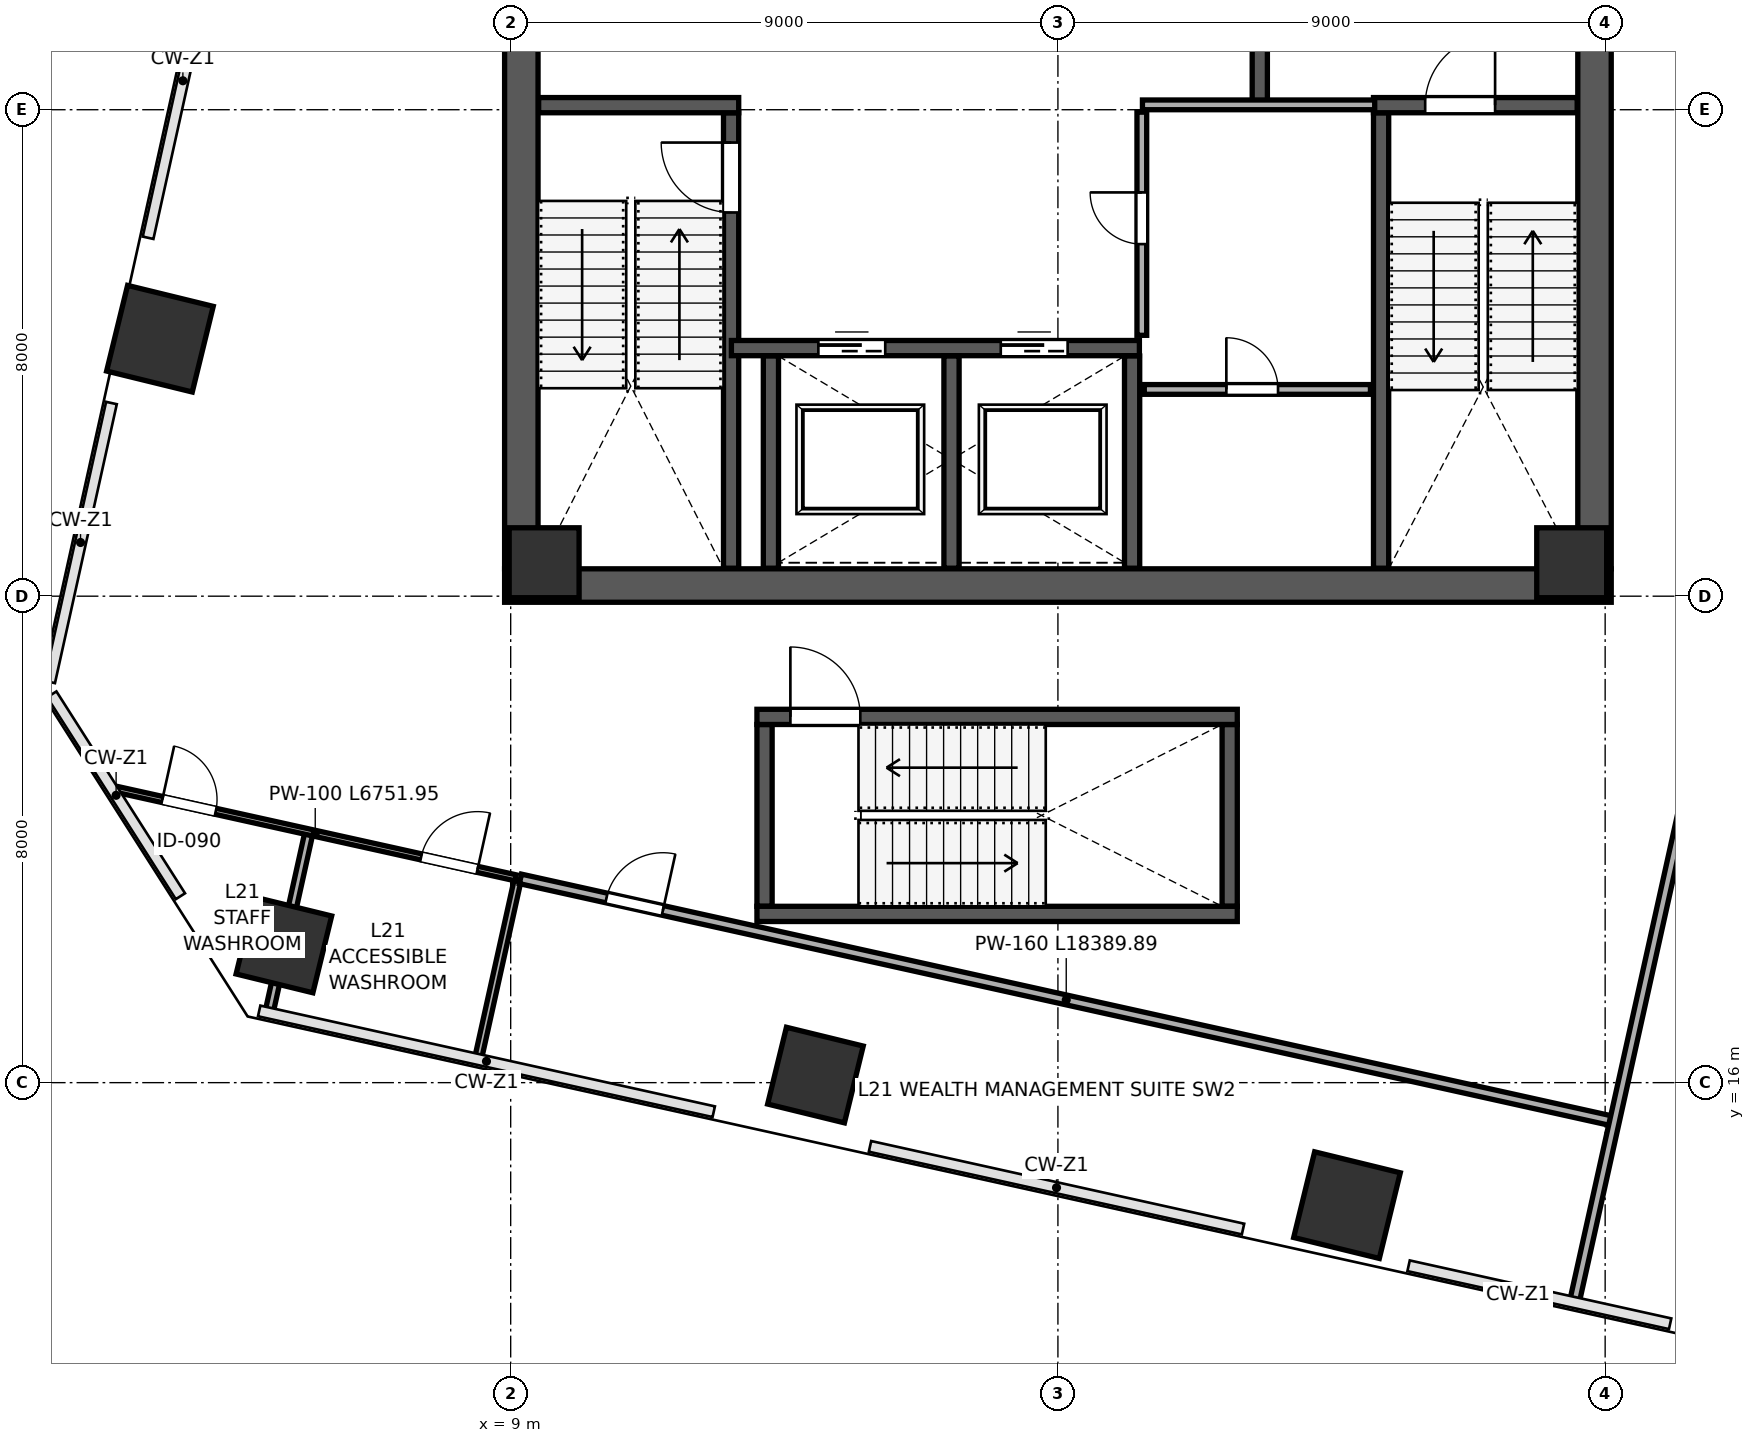
"""IFC4 building model, lengths in metres.
Left out: names, types, materials, properties, quantities, classifications, styles, units other than length and angle.
Written with IfcOpenShell. Run it as: python <this file> out.ifc"""

import sys

from ifc_helpers import new_model, si_unit, direction, frame, frame_2d, origin, origin_2d, place, context, subcontext, project, spatial, rectangle, extrude, clip, halfspace, source, transform, mapped, element, fill, save


model = new_model("IFC4")
c1 = context("Model", 3, precision=1e-05, world=origin(), true_north=direction((0.0, 1.0)))
c2 = subcontext(c1, "Body", "Model", "MODEL_VIEW")
j1 = project(units=[si_unit("LENGTHUNIT", "METRE"), si_unit("PLANEANGLEUNIT", "RADIAN")], contexts=[c1])
p1 = place(None, origin())
s1 = spatial("IfcSite", under=j1, at=p1, CompositionType="ELEMENT")
p2 = place(p1, origin())
s2 = spatial("IfcBuilding", under=s1, at=p2, CompositionType="ELEMENT")
p3 = place(p2, frame((0.0, 0.0, 95.8)))
s3 = spatial("IfcBuildingStorey", under=s2, at=p3, CompositionType="ELEMENT", Elevation=95.8)
m1 = source(origin(), c2, "Body", "SweptSolid", [
    extrude(rectangle(XDim=1.15, YDim=1.15, at=origin_2d()), origin(), (0.0, 0.0, 1.0), 4.198),
])
for number, where, z_axis, x_axis in (
    (1, (9.55, 24.55, 0.001), (0.0, 0.0, 1.0), (1.0, 0.0, 0.0)),
    (2, (26.45, 24.55, 0.001), (0.0, 0.0, 1.0), (1.0, 0.0, 0.0)),
):
    element("IfcColumn", number, at=place(p3, frame(where, z_axis=z_axis, x_axis=x_axis)), inside=s3, PredefinedType="COLUMN", context=c2, shape_type="MappedRepresentation", body=[
        mapped(m1, transform((0.0, 0.0, 0.0), scale=1.0)),
    ])
p4 = place(p3, frame((5.27, 18.264, 0.0), z_axis=(-0.070026755968, 0.084586774536, 0.993952378649), x_axis=(0.898867444645, 0.437442644785, 0.026100756318)))
e3 = element("IfcColumn", 3, at=p4, inside=s3, PredefinedType="COLUMN", context=c2, shape_type="Clipping", body=[
    clip(clip(extrude(rectangle(XDim=1.3, YDim=1.3, at=origin_2d()), origin(), (0.0, 0.0, 1.0), 4.226), halfspace(frame((0.0, 0.0, 0.088), z_axis=(0.0, 0.0, -1.0), x_axis=(1.0, 0.0, 0.0)), False)), halfspace(frame((0.0, 0.0, 4.138), z_axis=(0.0, 0.0, 1.0), x_axis=(1.0, 0.0, 0.0)), False)),
])
p5 = place(p3, frame((14.012, 16.125, 0.0), z_axis=(-0.08173927693, 0.039653969332, 0.995864575795), x_axis=(0.636933546754, 0.770616224226, 0.021593794944)))
e4 = element("IfcColumn", 4, at=p5, inside=s3, PredefinedType="COLUMN", context=c2, shape_type="Clipping", body=[
    clip(clip(extrude(rectangle(XDim=1.3, YDim=1.3, at=origin_2d()), origin(), (0.0, 0.0, 1.0), 4.217), halfspace(frame((0.0, 0.0, 0.072), z_axis=(0.0, 0.0, -1.0), x_axis=(1.0, 0.0, 0.0)), False)), halfspace(frame((0.0, 0.0, 4.145), z_axis=(0.0, 0.0, 1.0), x_axis=(1.0, 0.0, 0.0)), False)),
])
p6 = place(p3, frame((22.754, 13.986, 0.0), z_axis=(-0.093237134672, -0.005440279739, 0.995629067512), x_axis=(0.179664706688, 0.983477404155, 0.022198844298)))
e5 = element("IfcColumn", 5, at=p6, inside=s3, PredefinedType="COLUMN", context=c2, shape_type="Clipping", body=[
    clip(clip(extrude(rectangle(XDim=1.45, YDim=1.45, at=origin_2d()), origin(), (0.0, 0.0, 1.0), 4.219), halfspace(frame((0.0, 0.0, 0.083), z_axis=(0.0, 0.0, -1.0), x_axis=(1.0, 0.0, 0.0)), False)), halfspace(frame((0.0, 0.0, 4.135), z_axis=(0.0, 0.0, 1.0), x_axis=(1.0, 0.0, 0.0)), False)),
])
p7 = place(p3, frame((3.231, 28.234, 0.0), z_axis=(-0.018456845087, 0.094656421824, 0.995338890367), x_axis=(0.998664266223, -0.046306110542, 0.0229222053)))
e6 = element("IfcColumn", 6, at=p7, inside=s3, PredefinedType="COLUMN", context=c2, shape_type="Clipping", body=[
    clip(clip(extrude(rectangle(XDim=1.45, YDim=1.45, at=origin_2d()), origin(), (0.0, 0.0, 1.0), 4.22), halfspace(frame((0.0, 0.0, 0.086), z_axis=(0.0, 0.0, -1.0), x_axis=(1.0, 0.0, 0.0)), False)), halfspace(frame((0.0, 0.0, 4.134), z_axis=(0.0, 0.0, 1.0), x_axis=(1.0, 0.0, 0.0)), False)),
])
p8 = place(p3, frame((9.175, 24.45, 0.0), z_axis=(0.0, 0.0, 1.0), x_axis=(0.0, 1.0, 0.0)))
e7 = element("IfcWall", 7, at=p8, inside=s3, PredefinedType="SHEAR", context=c2, shape_type="SweptSolid", body=[
    extrude(rectangle(XDim=15.1, YDim=0.55, at=frame_2d((7.55, 0.0))), origin(), (0.0, 0.0, 1.0), 3.96),
])
p9 = place(p3, frame((26.825, 24.45, 0.0), z_axis=(0.0, 0.0, 1.0), x_axis=(0.0, 1.0, 0.0)))
e8 = element("IfcWall", 8, at=p9, inside=s3, PredefinedType="SHEAR", context=c2, shape_type="SweptSolid", body=[
    extrude(rectangle(XDim=15.1, YDim=0.55, at=frame_2d((7.55, 0.0))), origin(), (0.0, 0.0, 1.0), 3.96),
])
p10 = place(p9, frame((8.6, 0.0, 0.0)))
e9 = element("IfcOpeningElement", 9, at=p10, cuts=e8, PredefinedType="OPENING", context=c2, shape_type="SweptSolid", body=[
    extrude(rectangle(XDim=1.15, YDim=2.2, at=frame_2d((0.575, 1.1))), frame((0.0, 0.285, 0.0), z_axis=(0.0, -1.0, 0.0), x_axis=(1.0, 0.0, 0.0)), (0.0, 0.0, 1.0), 0.57),
])
p11 = place(p3, frame((8.9, 24.175, 0.0), z_axis=(0.0, 0.0, 1.0), x_axis=(1.0, 0.0, 0.0)))
e10 = element("IfcWall", 10, at=p11, inside=s3, PredefinedType="SHEAR", context=c2, shape_type="SweptSolid", body=[
    extrude(rectangle(XDim=18.2, YDim=0.55, at=frame_2d((9.1, 0.0))), origin(), (0.0, 0.0, 1.0), 3.96),
])
p12 = place(p3, frame((12.625, 24.46, 0.0), z_axis=(0.0, 0.0, 1.0), x_axis=(0.0, 1.0, 0.0)))
e11 = element("IfcWall", 11, at=p12, inside=s3, PredefinedType="SHEAR", context=c2, shape_type="SweptSolid", body=[
    extrude(rectangle(XDim=7.49, YDim=0.25, at=frame_2d((3.745, 0.0))), origin(), (0.0, 0.0, 1.0), 3.96),
])
p13 = place(p12, frame((5.85, 0.0, 0.0)))
e12 = element("IfcOpeningElement", 12, at=p13, cuts=e11, PredefinedType="OPENING", context=c2, shape_type="SweptSolid", body=[
    extrude(rectangle(XDim=1.15, YDim=2.2, at=frame_2d((0.575, 1.1))), frame((0.0, 0.135, 0.0), z_axis=(0.0, -1.0, 0.0), x_axis=(1.0, 0.0, 0.0)), (0.0, 0.0, 1.0), 0.27),
])
p14 = place(p3, frame((9.46, 32.075, 0.0), z_axis=(0.0, 0.0, 1.0), x_axis=(1.0, 0.0, 0.0)))
e13 = element("IfcWall", 13, at=p14, inside=s3, PredefinedType="SHEAR", context=c2, shape_type="SweptSolid", body=[
    extrude(rectangle(XDim=3.29, YDim=0.25, at=frame_2d((1.645, 0.0))), origin(), (0.0, 0.0, 1.0), 3.96),
])
p15 = place(p3, frame((23.315, 24.46, 0.0), z_axis=(0.0, 0.0, 1.0), x_axis=(0.0, 1.0, 0.0)))
e14 = element("IfcWall", 14, at=p15, inside=s3, PredefinedType="SHEAR", context=c2, shape_type="SweptSolid", body=[
    extrude(rectangle(XDim=7.49, YDim=0.25, at=frame_2d((3.745, 0.0))), origin(), (0.0, 0.0, 1.0), 3.96),
])
p16 = place(p3, frame((23.19, 32.075, 0.0), z_axis=(0.0, 0.0, 1.0), x_axis=(1.0, 0.0, 0.0)))
e15 = element("IfcWall", 15, at=p16, inside=s3, PredefinedType="SHEAR", context=c2, shape_type="SweptSolid", body=[
    extrude(rectangle(XDim=3.35, YDim=0.25, at=frame_2d((1.675, 0.0))), origin(), (0.0, 0.0, 1.0), 3.96),
])
p17 = place(p16, frame((0.85, 0.0, 0.0)))
e16 = element("IfcOpeningElement", 16, at=p17, cuts=e15, PredefinedType="OPENING", context=c2, shape_type="SweptSolid", body=[
    extrude(rectangle(XDim=1.15, YDim=2.2, at=frame_2d((0.575, 1.1))), frame((0.0, 0.135, 0.0), z_axis=(0.0, -1.0, 0.0), x_axis=(1.0, 0.0, 0.0)), (0.0, 0.0, 1.0), 0.27),
])
p18 = place(p3, frame((21.32, 32.12, 0.0), z_axis=(0.0, 0.0, 1.0), x_axis=(0.0, 1.0, 0.0)))
e17 = element("IfcWall", 17, at=p18, inside=s3, PredefinedType="SHEAR", context=c2, shape_type="SweptSolid", body=[
    extrude(rectangle(XDim=7.42, YDim=0.25, at=frame_2d((3.71, 0.0))), origin(), (0.0, 0.0, 1.0), 3.96),
])
p19 = place(p18, frame((1.4, 0.0, 0.0)))
e18 = element("IfcOpeningElement", 18, at=p19, cuts=e17, PredefinedType="OPENING", context=c2, shape_type="SweptSolid", body=[
    extrude(rectangle(XDim=1.15, YDim=2.2, at=frame_2d((0.575, 1.1))), frame((0.0, 0.135, 0.0), z_axis=(0.0, -1.0, 0.0), x_axis=(1.0, 0.0, 0.0)), (0.0, 0.0, 1.0), 0.27),
])
p20 = place(p3, frame((12.63, 28.08, 0.0), z_axis=(0.0, 0.0, 1.0), x_axis=(1.0, 0.0, 0.0)))
e19 = element("IfcWall", 19, at=p20, inside=s3, PredefinedType="SHEAR", context=c2, shape_type="SweptSolid", body=[
    extrude(rectangle(XDim=6.71, YDim=0.25, at=frame_2d((3.355, 0.0))), origin(), (0.0, 0.0, 1.0), 3.96),
])
p21 = place(p20, frame((1.43, 0.0, 0.0)))
e20 = element("IfcOpeningElement", 20, at=p21, cuts=e19, PredefinedType="OPENING", context=c2, shape_type="SweptSolid", body=[
    extrude(rectangle(XDim=1.1, YDim=2.2, at=frame_2d((0.55, 1.1))), frame((0.0, 0.135, 0.0), z_axis=(0.0, -1.0, 0.0), x_axis=(1.0, 0.0, 0.0)), (0.0, 0.0, 1.0), 0.27),
])
p22 = place(p20, frame((4.43, 0.0, 0.0)))
e21 = element("IfcOpeningElement", 21, at=p22, cuts=e19, PredefinedType="OPENING", context=c2, shape_type="SweptSolid", body=[
    extrude(rectangle(XDim=1.1, YDim=2.2, at=frame_2d((0.55, 1.1))), frame((0.0, 0.135, 0.0), z_axis=(0.0, -1.0, 0.0), x_axis=(1.0, 0.0, 0.0)), (0.0, 0.0, 1.0), 0.27),
])
for number, where, z_axis, x_axis in (
    (22, (13.28, 24.46, 0.0), (0.0, 0.0, 1.0), (0.0, 1.0, 0.0)),
    (23, (16.25, 24.46, 0.0), (0.0, 0.0, 1.0), (0.0, 1.0, 0.0)),
    (24, (19.22, 24.46, 0.0), (0.0, 0.0, 1.0), (0.0, 1.0, 0.0)),
):
    element("IfcWall", number, at=place(p3, frame(where, z_axis=z_axis, x_axis=x_axis)), inside=s3, PredefinedType="SHEAR", context=c2, shape_type="SweptSolid", body=[
        extrude(rectangle(XDim=3.49, YDim=0.25, at=frame_2d((1.745, 0.0))), origin(), (0.0, 0.0, 1.0), 3.96),
    ])
for number, where, z_axis, x_axis in (
    (25, (13.175, 18.9, 0.0), (0.0, 0.0, 1.0), (0.0, 1.0, 0.0)),
    (26, (20.825, 18.9, 0.0), (0.0, 0.0, 1.0), (0.0, 1.0, 0.0)),
):
    element("IfcWall", number, at=place(p3, frame(where, z_axis=z_axis, x_axis=x_axis)), inside=s3, PredefinedType="SHEAR", context=c2, shape_type="SweptSolid", body=[
        extrude(rectangle(XDim=2.99, YDim=0.25, at=frame_2d((1.495, 0.0))), origin(), (0.0, 0.0, 1.0), 3.96),
    ])
p23 = place(p3, frame((13.05, 18.775, 0.0), z_axis=(0.0, 0.0, 1.0), x_axis=(1.0, 0.0, 0.0)))
e27 = element("IfcWall", 27, at=p23, inside=s3, PredefinedType="SHEAR", context=c2, shape_type="SweptSolid", body=[
    extrude(rectangle(XDim=7.9, YDim=0.25, at=frame_2d((3.95, 0.0))), origin(), (0.0, 0.0, 1.0), 3.96),
])
p24 = place(p3, frame((13.05, 22.015, 0.0), z_axis=(0.0, 0.0, 1.0), x_axis=(1.0, 0.0, 0.0)))
e28 = element("IfcWall", 28, at=p24, inside=s3, PredefinedType="SHEAR", context=c2, shape_type="SweptSolid", body=[
    extrude(rectangle(XDim=7.9, YDim=0.25, at=frame_2d((3.95, 0.0))), origin(), (0.0, 0.0, 1.0), 3.96),
])
p25 = place(p24, frame((0.55, 0.0, 0.0)))
e29 = element("IfcOpeningElement", 29, at=p25, cuts=e28, PredefinedType="OPENING", context=c2, shape_type="SweptSolid", body=[
    extrude(rectangle(XDim=1.15, YDim=2.2, at=frame_2d((0.575, 1.1))), frame((0.0, 0.135, 0.0), z_axis=(0.0, -1.0, 0.0), x_axis=(1.0, 0.0, 0.0)), (0.0, 0.0, 1.0), 0.27),
])
p26 = place(p3, frame((19.39, 32.08, 0.0), z_axis=(0.0, 0.0, 1.0), x_axis=(1.0, 0.0, 0.0)))
e30 = element("IfcWall", 30, at=p26, inside=s3, PredefinedType="PARTITIONING", context=c2, shape_type="SweptSolid", body=[
    extrude(rectangle(XDim=3.82, YDim=0.16, at=frame_2d((1.91, 0.0))), origin(), (0.0, 0.0, 1.0), 3.96),
])
p27 = place(p3, frame((19.38, 28.29, 0.0), z_axis=(0.0, 0.0, 1.0), x_axis=(0.0, 1.0, 0.0)))
e31 = element("IfcWall", 31, at=p27, inside=s3, PredefinedType="PARTITIONING", context=c2, shape_type="SweptSolid", body=[
    extrude(rectangle(XDim=3.67, YDim=0.16, at=frame_2d((1.835, 0.0))), origin(), (0.0, 0.0, 1.0), 3.96),
])
p28 = place(p27, frame((1.5, 0.0, 0.0)))
e32 = element("IfcOpeningElement", 32, at=p28, cuts=e31, PredefinedType="OPENING", context=c2, shape_type="SweptSolid", body=[
    extrude(rectangle(XDim=0.85, YDim=2.1, at=frame_2d((0.425, 1.05))), frame((0.0, 0.09, 0.0), z_axis=(0.0, -1.0, 0.0), x_axis=(1.0, 0.0, 0.0)), (0.0, 0.0, 1.0), 0.18),
])
p29 = place(p3, frame((19.42, 27.4, 0.0), z_axis=(0.0, 0.0, 1.0), x_axis=(1.0, 0.0, 0.0)))
e33 = element("IfcWall", 33, at=p29, inside=s3, PredefinedType="PARTITIONING", context=c2, shape_type="SweptSolid", body=[
    extrude(rectangle(XDim=3.72, YDim=0.16, at=frame_2d((1.86, 0.0))), origin(), (0.0, 0.0, 1.0), 3.96),
])
p30 = place(p29, frame((1.35, 0.0, 0.0)))
e34 = element("IfcOpeningElement", 34, at=p30, cuts=e33, PredefinedType="OPENING", context=c2, shape_type="SweptSolid", body=[
    extrude(rectangle(XDim=0.85, YDim=2.1, at=frame_2d((0.425, 1.05))), frame((0.0, 0.09, 0.0), z_axis=(0.0, -1.0, 0.0), x_axis=(1.0, 0.0, 0.0)), (0.0, 0.0, 1.0), 0.18),
])
p31 = place(p3, frame((5.035, 17.193, 0.0), z_axis=(0.0, 0.0, 1.0), x_axis=(0.21636271828, 0.9763130513, 0.0)))
e35 = element("IfcWall", 35, at=p31, inside=s3, PredefinedType="PARTITIONING", context=c2, shape_type="SweptSolid", body=[
    extrude(rectangle(XDim=2.96, YDim=0.135, at=frame_2d((1.48, 0.0))), origin(), (0.0, 0.0, 1.0), 3.095),
])
p32 = place(p3, frame((8.471, 16.431, 0.0), z_axis=(0.0, 0.0, 1.0), x_axis=(0.216441341477, 0.976295624132, 0.0)))
e36 = element("IfcWall", 36, at=p32, inside=s3, PredefinedType="PARTITIONING", context=c2, shape_type="SweptSolid", body=[
    extrude(rectangle(XDim=2.96, YDim=0.115, at=frame_2d((1.48, 0.0))), origin(), (0.0, 0.0, 1.0), 3.095),
])
p33 = place(p3, frame((2.49, 20.83, 0.0), z_axis=(0.0, 0.0, 1.0), x_axis=(0.976294141914, -0.216448027167, 0.0)))
e37 = element("IfcWall", 37, at=p33, inside=s3, PredefinedType="PARTITIONING", context=c2, shape_type="SweptSolid", body=[
    extrude(rectangle(XDim=6.752, YDim=0.1, at=frame_2d((3.376, 0.0))), origin(), (0.0, 0.0, 1.0), 3.96),
])
p34 = place(p33, frame((0.8, 0.0, 0.0)))
e38 = element("IfcOpeningElement", 38, at=p34, cuts=e37, PredefinedType="OPENING", context=c2, shape_type="SweptSolid", body=[
    extrude(rectangle(XDim=0.9, YDim=2.15, at=frame_2d((0.45, 1.075))), frame((0.0, 0.06, 0.0), z_axis=(0.0, -1.0, 0.0), x_axis=(1.0, 0.0, 0.0)), (0.0, 0.0, 1.0), 0.12),
])
p35 = place(p33, frame((5.16, 0.0, 0.0)))
e39 = element("IfcOpeningElement", 39, at=p35, cuts=e37, PredefinedType="OPENING", context=c2, shape_type="SweptSolid", body=[
    extrude(rectangle(XDim=0.95, YDim=2.15, at=frame_2d((0.475, 1.075))), frame((0.0, 0.06, 0.0), z_axis=(0.0, -1.0, 0.0), x_axis=(1.0, 0.0, 0.0)), (0.0, 0.0, 1.0), 0.12),
])
p36 = place(p3, frame((9.16, 19.351, 0.0), z_axis=(0.0, 0.0, 1.0), x_axis=(0.97629657883, -0.216437035106, 0.0)))
e40 = element("IfcWall", 40, at=p36, inside=s3, PredefinedType="PARTITIONING", context=c2, shape_type="SweptSolid", body=[
    extrude(rectangle(XDim=18.39, YDim=0.16, at=frame_2d((9.195, 0.0))), origin(), (0.0, 0.0, 1.0), 3.96),
])
p37 = place(p36, frame((1.45, 0.0, 0.0)))
e41 = element("IfcOpeningElement", 41, at=p37, cuts=e40, PredefinedType="OPENING", context=c2, shape_type="SweptSolid", body=[
    extrude(rectangle(XDim=0.95, YDim=2.15, at=frame_2d((0.475, 1.075))), frame((0.0, 0.09, 0.0), z_axis=(0.0, -1.0, 0.0), x_axis=(1.0, 0.0, 0.0)), (0.0, 0.0, 1.0), 0.18),
])
p38 = place(p3, frame((26.504, 12.433, 0.0), z_axis=(0.0, 0.0, 1.0), x_axis=(0.216434476574, 0.976297146032, 0.0)))
e42 = element("IfcWall", 42, at=p38, inside=s3, PredefinedType="PARTITIONING", context=c2, shape_type="SweptSolid", body=[
    extrude(rectangle(XDim=20.38, YDim=0.16, at=frame_2d((10.19, 0.0))), origin(), (0.0, 0.0, 1.0), 3.96),
])
m2 = source(origin(), c2, "Body", "SweptSolid", [
    extrude(rectangle(XDim=1.15, YDim=2.2, at=frame_2d((0.575, 1.1))), frame((0.0, 0.025, 0.0), z_axis=(0.0, -1.0, 0.0), x_axis=(1.0, 0.0, 0.0)), (0.0, 0.0, 1.0), 0.05),
])
p39 = place(p13, origin())
e43 = element("IfcDoor", 43, at=p39, inside=s3, OperationType="SINGLE_SWING_RIGHT", PredefinedType="DOOR", context=c2, shape_type="MappedRepresentation", body=[
    mapped(m2, transform((0.0, 0.0, 0.0), scale=1.0)),
])
fill(e12, e43)
p40 = place(p17, origin())
e44 = element("IfcDoor", 44, at=p40, inside=s3, OperationType="SINGLE_SWING_RIGHT", PredefinedType="DOOR", context=c2, shape_type="MappedRepresentation", body=[
    mapped(m2, transform((0.0, 0.0, 0.0), scale=1.0)),
])
fill(e16, e44)
p41 = place(p25, origin())
e45 = element("IfcDoor", 45, at=p41, inside=s3, OperationType="SINGLE_SWING_LEFT", PredefinedType="DOOR", context=c2, shape_type="MappedRepresentation", body=[
    mapped(m2, transform((0.0, 0.0, 0.0), scale=1.0)),
])
fill(e29, e45)
m3 = source(origin(), c2, "Body", "SweptSolid", [
    extrude(rectangle(XDim=1.1, YDim=2.2, at=frame_2d((0.55, 1.1))), frame((0.0, 0.025, 0.0), z_axis=(0.0, -1.0, 0.0), x_axis=(1.0, 0.0, 0.0)), (0.0, 0.0, 1.0), 0.05),
])
p42 = place(p21, origin())
e46 = element("IfcDoor", 46, at=p42, inside=s3, OperationType="SLIDING_TO_LEFT", PredefinedType="DOOR", context=c2, shape_type="MappedRepresentation", body=[
    mapped(m3, transform((0.0, 0.0, 0.0), scale=1.0)),
])
fill(e20, e46)
p43 = place(p22, origin())
e47 = element("IfcDoor", 47, at=p43, inside=s3, OperationType="SLIDING_TO_RIGHT", PredefinedType="DOOR", context=c2, shape_type="MappedRepresentation", body=[
    mapped(m3, transform((0.0, 0.0, 0.0), scale=1.0)),
])
fill(e21, e47)
m4 = source(origin(), c2, "Body", "SweptSolid", [
    extrude(rectangle(XDim=0.85, YDim=2.1, at=frame_2d((0.425, 1.05))), frame((0.0, 0.025, 0.0), z_axis=(0.0, -1.0, 0.0), x_axis=(1.0, 0.0, 0.0)), (0.0, 0.0, 1.0), 0.05),
])
p44 = place(p30, origin())
e48 = element("IfcDoor", 48, at=p44, inside=s3, OperationType="SINGLE_SWING_LEFT", PredefinedType="DOOR", context=c2, shape_type="MappedRepresentation", body=[
    mapped(m4, transform((0.0, 0.0, 0.0), scale=1.0)),
])
fill(e34, e48)
p45 = place(p28, origin())
e49 = element("IfcDoor", 49, at=p45, inside=s3, OperationType="SINGLE_SWING_RIGHT", PredefinedType="DOOR", context=c2, shape_type="MappedRepresentation", body=[
    mapped(m4, transform((0.0, 0.0, 0.0), scale=1.0)),
])
fill(e32, e49)
m5 = source(origin(), c2, "Body", "SweptSolid", [
    extrude(rectangle(XDim=0.9, YDim=2.15, at=frame_2d((0.45, 1.075))), frame((0.0, 0.025, 0.0), z_axis=(0.0, -1.0, 0.0), x_axis=(1.0, 0.0, 0.0)), (0.0, 0.0, 1.0), 0.05),
])
p46 = place(p34, origin())
e50 = element("IfcDoor", 50, at=p46, inside=s3, OperationType="SINGLE_SWING_LEFT", PredefinedType="DOOR", context=c2, shape_type="MappedRepresentation", body=[
    mapped(m5, transform((0.0, 0.0, 0.0), scale=1.0)),
])
fill(e38, e50)
m6 = source(origin(), c2, "Body", "SweptSolid", [
    extrude(rectangle(XDim=0.95, YDim=2.15, at=frame_2d((0.475, 1.075))), frame((0.0, 0.025, 0.0), z_axis=(0.0, -1.0, 0.0), x_axis=(1.0, 0.0, 0.0)), (0.0, 0.0, 1.0), 0.05),
])
p47 = place(p35, origin())
e51 = element("IfcDoor", 51, at=p47, inside=s3, OperationType="SINGLE_SWING_RIGHT", PredefinedType="DOOR", context=c2, shape_type="MappedRepresentation", body=[
    mapped(m6, transform((0.0, 0.0, 0.0), scale=1.0)),
])
fill(e39, e51)
m7 = source(origin(), c2, "Body", "SweptSolid", [
    extrude(rectangle(XDim=0.95, YDim=2.15, at=frame_2d((0.475, 1.075))), frame((0.0, 0.025, 0.0), z_axis=(0.0, -1.0, 0.0), x_axis=(1.0, 0.0, 0.0)), (0.0, 0.0, 1.0), 0.05),
])
p48 = place(p37, origin())
e52 = element("IfcDoor", 52, at=p48, inside=s3, OperationType="SINGLE_SWING_RIGHT", PredefinedType="DOOR", context=c2, shape_type="MappedRepresentation", body=[
    mapped(m7, transform((0.0, 0.0, 0.0), scale=1.0)),
])
fill(e41, e52)
save(model, sys.argv[1])
